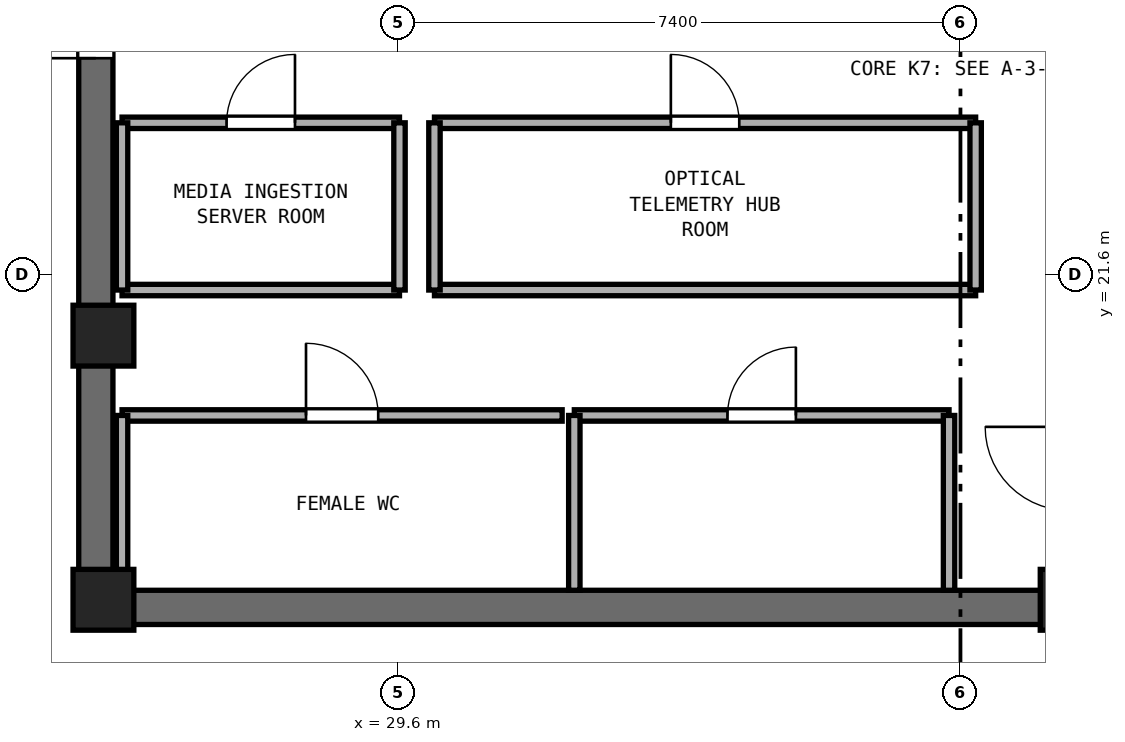
"""IFC4 building model, lengths in metres.
Left out: names, types, materials, properties, quantities, classifications, styles, units other than length and angle.
Written with IfcOpenShell. Run it as: python <this file> out.ifc"""

import sys

from ifc_helpers import new_model, si_unit, direction, frame, frame_2d, origin, origin_2d, place, context, subcontext, project, spatial, rectangle, extrude, element, fill, save


model = new_model("IFC4")
c1 = context("Model", 3, precision=1e-05, world=origin(), true_north=direction((0.0, 1.0)))
c2 = subcontext(c1, "Body", "Model", "MODEL_VIEW")
j1 = project(units=[si_unit("LENGTHUNIT", "METRE"), si_unit("PLANEANGLEUNIT", "RADIAN")], contexts=[c1])
p1 = place(None, origin())
s1 = spatial("IfcSite", under=j1, at=p1, CompositionType="ELEMENT")
p2 = place(p1, origin())
s2 = spatial("IfcBuilding", under=s1, at=p2, CompositionType="ELEMENT")
p3 = place(p2, frame((0.0, 0.0, 228.8)))
s3 = spatial("IfcBuildingStorey", under=s2, at=p3, CompositionType="ELEMENT", Elevation=228.8)
p4 = place(p3, frame((25.4, 17.225, 0.0), z_axis=(0.0, 0.0, 1.0), x_axis=(1.0, 0.0, 0.0)))
e1 = element("IfcWall", 1, at=p4, inside=s3, PredefinedType="SHEAR", context=c2, shape_type="SweptSolid", body=[
    extrude(rectangle(XDim=23.2, YDim=0.45, at=frame_2d((11.6, 0.0))), origin(), (0.0, 0.0, 1.0), 3.51),
])
p5 = place(p3, frame((25.625, 17.45, 0.0), z_axis=(0.0, 0.0, 1.0), x_axis=(0.0, 1.0, 0.0)))
e2 = element("IfcWall", 2, at=p5, inside=s3, PredefinedType="SHEAR", context=c2, shape_type="SweptSolid", body=[
    extrude(rectangle(XDim=15.5, YDim=0.45, at=frame_2d((7.75, 0.0))), origin(), (0.0, 0.0, 1.0), 3.51),
])
p6 = place(p5, frame((7.0, 0.0, 0.0)))
e3 = element("IfcOpeningElement", 3, at=p6, cuts=e2, PredefinedType="OPENING", context=c2, shape_type="SweptSolid", body=[
    extrude(rectangle(XDim=1.5, YDim=2.15, at=frame_2d((0.75, 1.075))), frame((0.0, 0.235, 0.0), z_axis=(0.0, -1.0, 0.0), x_axis=(1.0, 0.0, 0.0)), (0.0, 0.0, 1.0), 0.47),
])
for number, where, z_axis, x_axis in (
    (4, (25.725, 17.325, 0.0), (0.0, 0.0, 1.0), (1.0, 0.0, 0.0)),
    (5, (38.45, 17.325, 0.0), (0.0, 0.0, 1.0), (1.0, 0.0, 0.0)),
    (6, (25.725, 20.8, 0.0), (0.0, 0.0, 1.0), (1.0, 0.0, 0.0)),
):
    element("IfcColumn", number, at=place(p3, frame(where, z_axis=z_axis, x_axis=x_axis)), inside=s3, PredefinedType="PILASTER", context=c2, shape_type="SweptSolid", body=[
        extrude(rectangle(XDim=0.8, YDim=0.8, at=origin_2d()), origin(), (0.0, 0.0, 1.0), 3.8),
    ])
p7 = place(p3, frame((25.97, 19.75, 0.0), z_axis=(0.0, 0.0, 1.0), x_axis=(1.0, 0.0, 0.0)))
e7 = element("IfcWall", 7, at=p7, inside=s3, PredefinedType="PARTITIONING", context=c2, shape_type="SweptSolid", body=[
    extrude(rectangle(XDim=5.79, YDim=0.15, at=frame_2d((2.895, 0.0))), origin(), (0.0, 0.0, 1.0), 3.51),
])
p8 = place(p7, frame((2.42, 0.0, 0.0)))
e8 = element("IfcOpeningElement", 8, at=p8, cuts=e7, PredefinedType="OPENING", context=c2, shape_type="SweptSolid", body=[
    extrude(rectangle(XDim=0.95, YDim=2.1, at=frame_2d((0.475, 1.05))), frame((0.0, 0.085, 0.0), z_axis=(0.0, -1.0, 0.0), x_axis=(1.0, 0.0, 0.0)), (0.0, 0.0, 1.0), 0.17),
])
p9 = place(p3, frame((25.97, 17.45, 0.0), z_axis=(0.0, 0.0, 1.0), x_axis=(0.0, 1.0, 0.0)))
e9 = element("IfcWall", 9, at=p9, inside=s3, PredefinedType="PARTITIONING", context=c2, shape_type="SweptSolid", body=[
    extrude(rectangle(XDim=2.3, YDim=0.15, at=frame_2d((1.15, 0.0))), origin(), (0.0, 0.0, 1.0), 2.61),
])
p10 = place(p3, frame((31.92, 19.75, 0.0), z_axis=(0.0, 0.0, 1.0), x_axis=(1.0, 0.0, 0.0)))
e10 = element("IfcWall", 10, at=p10, inside=s3, PredefinedType="PARTITIONING", context=c2, shape_type="SweptSolid", body=[
    extrude(rectangle(XDim=4.93, YDim=0.15, at=frame_2d((2.465, 0.0))), origin(), (0.0, 0.0, 1.0), 3.51),
])
p11 = place(p10, frame((2.015, 0.0, 0.0)))
e11 = element("IfcOpeningElement", 11, at=p11, cuts=e10, PredefinedType="OPENING", context=c2, shape_type="SweptSolid", body=[
    extrude(rectangle(XDim=0.9, YDim=2.1, at=frame_2d((0.45, 1.05))), frame((0.0, 0.085, 0.0), z_axis=(0.0, -1.0, 0.0), x_axis=(1.0, 0.0, 0.0)), (0.0, 0.0, 1.0), 0.17),
])
for number, where, z_axis, x_axis in (
    (12, (31.92, 17.45, 0.0), (0.0, 0.0, 1.0), (0.0, 1.0, 0.0)),
    (13, (36.85, 17.45, 0.0), (0.0, 0.0, 1.0), (0.0, 1.0, 0.0)),
):
    element("IfcWall", number, at=place(p3, frame(where, z_axis=z_axis, x_axis=x_axis)), inside=s3, PredefinedType="PARTITIONING", context=c2, shape_type="SweptSolid", body=[
        extrude(rectangle(XDim=2.3, YDim=0.15, at=frame_2d((1.15, 0.0))), origin(), (0.0, 0.0, 1.0), 3.51),
    ])
p12 = place(p3, frame((25.97, 21.4, 0.0), z_axis=(0.0, 0.0, 1.0), x_axis=(1.0, 0.0, 0.0)))
e14 = element("IfcWall", 14, at=p12, inside=s3, PredefinedType="PARTITIONING", context=c2, shape_type="SweptSolid", body=[
    extrude(rectangle(XDim=3.65, YDim=0.15, at=frame_2d((1.825, 0.0))), origin(), (0.0, 0.0, 1.0), 3.51),
])
p13 = place(p3, frame((25.97, 23.6, 0.0), z_axis=(0.0, 0.0, 1.0), x_axis=(1.0, 0.0, 0.0)))
e15 = element("IfcWall", 15, at=p13, inside=s3, PredefinedType="PARTITIONING", context=c2, shape_type="SweptSolid", body=[
    extrude(rectangle(XDim=3.65, YDim=0.15, at=frame_2d((1.825, 0.0))), origin(), (0.0, 0.0, 1.0), 3.51),
])
p14 = place(p13, frame((1.375, 0.0, 0.0)))
e16 = element("IfcOpeningElement", 16, at=p14, cuts=e15, PredefinedType="OPENING", context=c2, shape_type="SweptSolid", body=[
    extrude(rectangle(XDim=0.9, YDim=2.1, at=frame_2d((0.45, 1.05))), frame((0.0, 0.085, 0.0), z_axis=(0.0, -1.0, 0.0), x_axis=(1.0, 0.0, 0.0)), (0.0, 0.0, 1.0), 0.17),
])
p15 = place(p3, frame((25.97, 21.4, 0.0), z_axis=(0.0, 0.0, 1.0), x_axis=(0.0, 1.0, 0.0)))
e17 = element("IfcWall", 17, at=p15, inside=s3, PredefinedType="PARTITIONING", context=c2, shape_type="SweptSolid", body=[
    extrude(rectangle(XDim=2.2, YDim=0.15, at=frame_2d((1.1, 0.0))), origin(), (0.0, 0.0, 1.0), 2.61),
])
p16 = place(p3, frame((29.62, 21.4, 0.0), z_axis=(0.0, 0.0, 1.0), x_axis=(0.0, 1.0, 0.0)))
e18 = element("IfcWall", 18, at=p16, inside=s3, PredefinedType="PARTITIONING", context=c2, shape_type="SweptSolid", body=[
    extrude(rectangle(XDim=2.2, YDim=0.15, at=frame_2d((1.1, 0.0))), origin(), (0.0, 0.0, 1.0), 3.51),
])
p17 = place(p3, frame((30.08, 21.4, 0.0), z_axis=(0.0, 0.0, 1.0), x_axis=(1.0, 0.0, 0.0)))
e19 = element("IfcWall", 19, at=p17, inside=s3, PredefinedType="PARTITIONING", context=c2, shape_type="SweptSolid", body=[
    extrude(rectangle(XDim=7.12, YDim=0.15, at=frame_2d((3.56, 0.0))), origin(), (0.0, 0.0, 1.0), 3.51),
])
p18 = place(p3, frame((30.08, 23.6, 0.0), z_axis=(0.0, 0.0, 1.0), x_axis=(1.0, 0.0, 0.0)))
e20 = element("IfcWall", 20, at=p18, inside=s3, PredefinedType="PARTITIONING", context=c2, shape_type="SweptSolid", body=[
    extrude(rectangle(XDim=7.12, YDim=0.15, at=frame_2d((3.56, 0.0))), origin(), (0.0, 0.0, 1.0), 3.51),
])
p19 = place(p18, frame((3.11, 0.0, 0.0)))
e21 = element("IfcOpeningElement", 21, at=p19, cuts=e20, PredefinedType="OPENING", context=c2, shape_type="SweptSolid", body=[
    extrude(rectangle(XDim=0.9, YDim=2.1, at=frame_2d((0.45, 1.05))), frame((0.0, 0.085, 0.0), z_axis=(0.0, -1.0, 0.0), x_axis=(1.0, 0.0, 0.0)), (0.0, 0.0, 1.0), 0.17),
])
for number, where, z_axis, x_axis in (
    (22, (30.08, 21.4, 0.0), (0.0, 0.0, 1.0), (0.0, 1.0, 0.0)),
    (23, (37.2, 21.4, 0.0), (0.0, 0.0, 1.0), (0.0, 1.0, 0.0)),
):
    element("IfcWall", number, at=place(p3, frame(where, z_axis=z_axis, x_axis=x_axis)), inside=s3, PredefinedType="PARTITIONING", context=c2, shape_type="SweptSolid", body=[
        extrude(rectangle(XDim=2.2, YDim=0.15, at=frame_2d((1.1, 0.0))), origin(), (0.0, 0.0, 1.0), 3.51),
    ])
p20 = place(p6, origin())
e24 = element("IfcDoor", 24, at=p20, inside=s3, OperationType="DOUBLE_DOOR_SINGLE_SWING", PredefinedType="DOOR", context=c2, shape_type="SweptSolid", body=[
    extrude(rectangle(XDim=1.5, YDim=2.15, at=frame_2d((0.75, 1.075))), frame((0.0, 0.025, 0.0), z_axis=(0.0, -1.0, 0.0), x_axis=(1.0, 0.0, 0.0)), (0.0, 0.0, 1.0), 0.05),
])
fill(e3, e24)
p21 = place(p8, origin())
e25 = element("IfcDoor", 25, at=p21, inside=s3, OperationType="SINGLE_SWING_LEFT", PredefinedType="DOOR", context=c2, shape_type="SweptSolid", body=[
    extrude(rectangle(XDim=0.95, YDim=2.1, at=frame_2d((0.475, 1.05))), frame((0.0, 0.025, 0.0), z_axis=(0.0, -1.0, 0.0), x_axis=(1.0, 0.0, 0.0)), (0.0, 0.0, 1.0), 0.05),
])
fill(e8, e25)
p22 = place(p11, origin())
e26 = element("IfcDoor", 26, at=p22, inside=s3, OperationType="SINGLE_SWING_RIGHT", PredefinedType="DOOR", context=c2, shape_type="SweptSolid", body=[
    extrude(rectangle(XDim=0.9, YDim=2.1, at=frame_2d((0.45, 1.05))), frame((0.0, 0.025, 0.0), z_axis=(0.0, -1.0, 0.0), x_axis=(1.0, 0.0, 0.0)), (0.0, 0.0, 1.0), 0.05),
])
fill(e11, e26)
p23 = place(p14, origin())
e27 = element("IfcDoor", 27, at=p23, inside=s3, OperationType="SINGLE_SWING_RIGHT", PredefinedType="DOOR", context=c2, shape_type="SweptSolid", body=[
    extrude(rectangle(XDim=0.9, YDim=2.1, at=frame_2d((0.45, 1.05))), frame((0.0, 0.025, 0.0), z_axis=(0.0, -1.0, 0.0), x_axis=(1.0, 0.0, 0.0)), (0.0, 0.0, 1.0), 0.05),
])
fill(e16, e27)
p24 = place(p19, origin())
e28 = element("IfcDoor", 28, at=p24, inside=s3, OperationType="SINGLE_SWING_LEFT", PredefinedType="DOOR", context=c2, shape_type="SweptSolid", body=[
    extrude(rectangle(XDim=0.9, YDim=2.1, at=frame_2d((0.45, 1.05))), frame((0.0, 0.025, 0.0), z_axis=(0.0, -1.0, 0.0), x_axis=(1.0, 0.0, 0.0)), (0.0, 0.0, 1.0), 0.05),
])
fill(e21, e28)
save(model, sys.argv[1])
